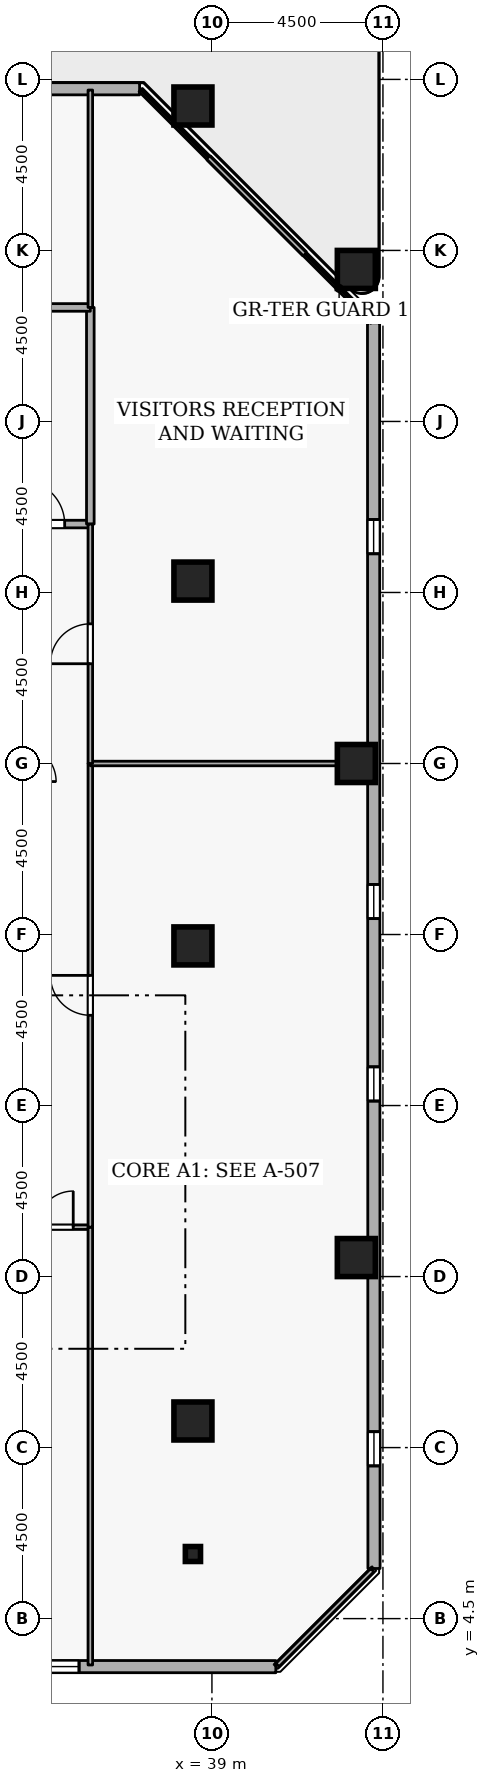
"""IFC4 building model, lengths in metres.
Left out: names, types, materials, properties, quantities, classifications, styles, units other than length and angle.
Written with IfcOpenShell. Run it as: python <this file> out.ifc"""

import sys

from ifc_helpers import new_model, si_unit, direction, frame, frame_2d, origin, origin_2d, place, context, subcontext, project, spatial, rectangle, i_section, extrude, element, fill, save


model = new_model("IFC4")
c1 = context("Model", 3, precision=1e-05, world=origin(), true_north=direction((0.0, 1.0)))
c2 = subcontext(c1, "Body", "Model", "MODEL_VIEW")
j1 = project(units=[si_unit("LENGTHUNIT", "METRE"), si_unit("PLANEANGLEUNIT", "RADIAN")], contexts=[c1])
p1 = place(None, origin())
s1 = spatial("IfcSite", under=j1, at=p1, CompositionType="ELEMENT")
p2 = place(p1, origin())
s2 = spatial("IfcBuilding", under=s1, at=p2, CompositionType="ELEMENT")
p3 = place(p2, frame((0.0, 0.0, 229.5)))
s3 = spatial("IfcBuildingStorey", under=s2, at=p3, CompositionType="ELEMENT", Elevation=229.5)
for number, where, z_axis, x_axis in (
    (1, (38.5, 9.7, 0.0), (0.0, 0.0, 1.0), (1.0, 0.0, 0.0)),
    (2, (42.8, 14.0, 0.0), (0.0, 0.0, 1.0), (1.0, 0.0, 0.0)),
    (3, (42.8, 27.0, 0.0), (0.0, 0.0, 1.0), (1.0, 0.0, 0.0)),
    (4, (42.8, 40.0, 0.0), (0.0, 0.0, 1.0), (1.0, 0.0, 0.0)),
    (5, (38.5, 44.3, 0.0), (0.0, 0.0, 1.0), (1.0, 0.0, 0.0)),
    (6, (38.5, 22.2, 0.0), (0.0, 0.0, 1.0), (1.0, 0.0, 0.0)),
    (7, (38.5, 31.8, 0.0), (0.0, 0.0, 1.0), (1.0, 0.0, 0.0)),
):
    element("IfcColumn", number, at=place(p3, frame(where, z_axis=z_axis, x_axis=x_axis)), inside=s3, PredefinedType="COLUMN", context=c2, shape_type="SweptSolid", body=[
        extrude(rectangle(XDim=1.0, YDim=1.0, at=origin_2d()), origin(), (0.0, 0.0, 1.0), 3.6),
    ])
p4 = place(p3, frame((38.5, 6.2, 0.0), z_axis=(0.0, 0.0, 1.0), x_axis=(1.0, 0.0, 0.0)))
e8 = element("IfcColumn", 8, at=p4, inside=s3, PredefinedType="COLUMN", context=c2, shape_type="SweptSolid", body=[
    extrude(i_section(OverallWidth=0.399, OverallDepth=0.394, WebThickness=0.023, FlangeThickness=0.037, FilletRadius=0.015, at=origin_2d()), origin(), (0.0, 0.0, 1.0), 3.6),
])
p5 = place(p3, frame((7.904, 3.247, 0.0), z_axis=(0.0, 0.0, 1.0), x_axis=(0.999999933399, -0.000364968916, 0.0)))
e9 = element("IfcWall", 9, at=p5, inside=s3, PredefinedType="STANDARD", context=c2, shape_type="SweptSolid", body=[
    extrude(rectangle(XDim=32.778, YDim=0.32, at=frame_2d((16.389, 0.0))), origin(), (0.0, 0.0, 1.0), 2.7),
])
p6 = place(p5, frame((2.7, 0.0, 0.72)))
e10 = element("IfcOpeningElement", 10, at=p6, cuts=e9, PredefinedType="OPENING", context=c2, shape_type="SweptSolid", body=[
    extrude(rectangle(XDim=0.9, YDim=1.75, at=frame_2d((0.45, 0.875))), frame((0.0, 0.17, 0.0), z_axis=(0.0, -1.0, 0.0), x_axis=(1.0, 0.0, 0.0)), (0.0, 0.0, 1.0), 0.34),
])
p7 = place(p5, frame((12.3, 0.0, 0.72)))
e11 = element("IfcOpeningElement", 11, at=p7, cuts=e9, PredefinedType="OPENING", context=c2, shape_type="SweptSolid", body=[
    extrude(rectangle(XDim=0.9, YDim=1.75, at=frame_2d((0.45, 0.875))), frame((0.0, 0.17, 0.0), z_axis=(0.0, -1.0, 0.0), x_axis=(1.0, 0.0, 0.0)), (0.0, 0.0, 1.0), 0.34),
])
p8 = place(p5, frame((17.1, 0.0, 0.72)))
e12 = element("IfcOpeningElement", 12, at=p8, cuts=e9, PredefinedType="OPENING", context=c2, shape_type="SweptSolid", body=[
    extrude(rectangle(XDim=0.9, YDim=1.75, at=frame_2d((0.45, 0.875))), frame((0.0, 0.17, 0.0), z_axis=(0.0, -1.0, 0.0), x_axis=(1.0, 0.0, 0.0)), (0.0, 0.0, 1.0), 0.34),
])
p9 = place(p5, frame((21.9, 0.0, 0.72)))
e13 = element("IfcOpeningElement", 13, at=p9, cuts=e9, PredefinedType="OPENING", context=c2, shape_type="SweptSolid", body=[
    extrude(rectangle(XDim=0.9, YDim=1.75, at=frame_2d((0.45, 0.875))), frame((0.0, 0.17, 0.0), z_axis=(0.0, -1.0, 0.0), x_axis=(1.0, 0.0, 0.0)), (0.0, 0.0, 1.0), 0.34),
])
p10 = place(p5, frame((26.7, 0.0, 0.72)))
e14 = element("IfcOpeningElement", 14, at=p10, cuts=e9, PredefinedType="OPENING", context=c2, shape_type="SweptSolid", body=[
    extrude(rectangle(XDim=0.9, YDim=1.75, at=frame_2d((0.45, 0.875))), frame((0.0, 0.17, 0.0), z_axis=(0.0, -1.0, 0.0), x_axis=(1.0, 0.0, 0.0)), (0.0, 0.0, 1.0), 0.34),
])
p11 = place(p3, frame((43.265, 5.819, 0.0), z_axis=(0.0, 0.0, 1.0), x_axis=(-0.000364968916, 0.999999933399, 0.0)))
e15 = element("IfcWall", 15, at=p11, inside=s3, PredefinedType="STANDARD", context=c2, shape_type="SweptSolid", body=[
    extrude(rectangle(XDim=32.778, YDim=0.32, at=frame_2d((16.389, 0.0))), origin(), (0.0, 0.0, 1.0), 2.7),
])
p12 = place(p11, frame((2.7, 0.0, 0.72)))
e16 = element("IfcOpeningElement", 16, at=p12, cuts=e15, PredefinedType="OPENING", context=c2, shape_type="SweptSolid", body=[
    extrude(rectangle(XDim=0.9, YDim=1.75, at=frame_2d((0.45, 0.875))), frame((0.0, 0.17, 0.0), z_axis=(0.0, -1.0, 0.0), x_axis=(1.0, 0.0, 0.0)), (0.0, 0.0, 1.0), 0.34),
])
p13 = place(p11, frame((12.3, 0.0, 0.72)))
e17 = element("IfcOpeningElement", 17, at=p13, cuts=e15, PredefinedType="OPENING", context=c2, shape_type="SweptSolid", body=[
    extrude(rectangle(XDim=0.9, YDim=1.75, at=frame_2d((0.45, 0.875))), frame((0.0, 0.17, 0.0), z_axis=(0.0, -1.0, 0.0), x_axis=(1.0, 0.0, 0.0)), (0.0, 0.0, 1.0), 0.34),
])
p14 = place(p11, frame((17.1, 0.0, 0.72)))
e18 = element("IfcOpeningElement", 18, at=p14, cuts=e15, PredefinedType="OPENING", context=c2, shape_type="SweptSolid", body=[
    extrude(rectangle(XDim=0.9, YDim=1.75, at=frame_2d((0.45, 0.875))), frame((0.0, 0.17, 0.0), z_axis=(0.0, -1.0, 0.0), x_axis=(1.0, 0.0, 0.0)), (0.0, 0.0, 1.0), 0.34),
])
p15 = place(p11, frame((26.7, 0.0, 0.72)))
e19 = element("IfcOpeningElement", 19, at=p15, cuts=e15, PredefinedType="OPENING", context=c2, shape_type="SweptSolid", body=[
    extrude(rectangle(XDim=0.9, YDim=1.75, at=frame_2d((0.45, 0.875))), frame((0.0, 0.17, 0.0), z_axis=(0.0, -1.0, 0.0), x_axis=(1.0, 0.0, 0.0)), (0.0, 0.0, 1.0), 0.34),
])
p16 = place(p3, frame((37.096, 44.753, 0.0), z_axis=(0.0, 0.0, 1.0), x_axis=(-0.999999933399, 0.000364968916, 0.0)))
e20 = element("IfcWall", 20, at=p16, inside=s3, PredefinedType="STANDARD", context=c2, shape_type="SweptSolid", body=[
    extrude(rectangle(XDim=32.778, YDim=0.32, at=frame_2d((16.389, 0.0))), origin(), (0.0, 0.0, 1.0), 2.7),
])
p17 = place(p16, frame((19.914, 0.0, 0.0)))
e21 = element("IfcOpeningElement", 21, at=p17, cuts=e20, PredefinedType="OPENING", context=c2, shape_type="SweptSolid", body=[
    extrude(rectangle(XDim=1.15, YDim=2.1, at=frame_2d((0.575, 1.05))), frame((0.0, 0.17, 0.0), z_axis=(0.0, -1.0, 0.0), x_axis=(1.0, 0.0, 0.0)), (0.0, 0.0, 1.0), 0.34),
])
p18 = place(p16, frame((2.7, 0.0, 0.72)))
e22 = element("IfcOpeningElement", 22, at=p18, cuts=e20, PredefinedType="OPENING", context=c2, shape_type="SweptSolid", body=[
    extrude(rectangle(XDim=0.9, YDim=1.75, at=frame_2d((0.45, 0.875))), frame((0.0, 0.17, 0.0), z_axis=(0.0, -1.0, 0.0), x_axis=(1.0, 0.0, 0.0)), (0.0, 0.0, 1.0), 0.34),
])
p19 = place(p16, frame((7.5, 0.0, 0.72)))
e23 = element("IfcOpeningElement", 23, at=p19, cuts=e20, PredefinedType="OPENING", context=c2, shape_type="SweptSolid", body=[
    extrude(rectangle(XDim=0.9, YDim=1.75, at=frame_2d((0.45, 0.875))), frame((0.0, 0.17, 0.0), z_axis=(0.0, -1.0, 0.0), x_axis=(1.0, 0.0, 0.0)), (0.0, 0.0, 1.0), 0.34),
])
p20 = place(p16, frame((17.1, 0.0, 0.72)))
e24 = element("IfcOpeningElement", 24, at=p20, cuts=e20, PredefinedType="OPENING", context=c2, shape_type="SweptSolid", body=[
    extrude(rectangle(XDim=0.9, YDim=1.75, at=frame_2d((0.45, 0.875))), frame((0.0, 0.17, 0.0), z_axis=(0.0, -1.0, 0.0), x_axis=(1.0, 0.0, 0.0)), (0.0, 0.0, 1.0), 0.34),
])
p21 = place(p16, frame((21.9, 0.0, 0.72)))
e25 = element("IfcOpeningElement", 25, at=p21, cuts=e20, PredefinedType="OPENING", context=c2, shape_type="SweptSolid", body=[
    extrude(rectangle(XDim=0.9, YDim=1.75, at=frame_2d((0.45, 0.875))), frame((0.0, 0.17, 0.0), z_axis=(0.0, -1.0, 0.0), x_axis=(1.0, 0.0, 0.0)), (0.0, 0.0, 1.0), 0.34),
])
p22 = place(p16, frame((26.7, 0.0, 0.72)))
e26 = element("IfcOpeningElement", 26, at=p22, cuts=e20, PredefinedType="OPENING", context=c2, shape_type="SweptSolid", body=[
    extrude(rectangle(XDim=0.9, YDim=1.75, at=frame_2d((0.45, 0.875))), frame((0.0, 0.17, 0.0), z_axis=(0.0, -1.0, 0.0), x_axis=(1.0, 0.0, 0.0)), (0.0, 0.0, 1.0), 0.34),
])
p23 = place(p3, frame((33.3, 33.3, 0.0), z_axis=(0.0, 0.0, 1.0), x_axis=(1.0, 0.0, 0.0)))
e27 = element("IfcWall", 27, at=p23, inside=s3, PredefinedType="STANDARD", context=c2, shape_type="SweptSolid", body=[
    extrude(rectangle(XDim=2.5, YDim=0.2, at=frame_2d((1.25, 0.0))), origin(), (0.0, 0.0, 1.0), 3.3),
])
p24 = place(p23, frame((0.675, 0.0, 0.0)))
e28 = element("IfcOpeningElement", 28, at=p24, cuts=e27, PredefinedType="OPENING", context=c2, shape_type="SweptSolid", body=[
    extrude(rectangle(XDim=1.15, YDim=2.1, at=frame_2d((0.575, 1.05))), frame((0.0, 0.11, 0.0), z_axis=(0.0, -1.0, 0.0), x_axis=(1.0, 0.0, 0.0)), (0.0, 0.0, 1.0), 0.22),
])
p25 = place(p3, frame((35.8, 33.3, 0.0), z_axis=(0.0, 0.0, 1.0), x_axis=(0.0, 1.0, 0.0)))
e29 = element("IfcWall", 29, at=p25, inside=s3, PredefinedType="STANDARD", context=c2, shape_type="SweptSolid", body=[
    extrude(rectangle(XDim=5.7, YDim=0.2, at=frame_2d((2.85, 0.0))), origin(), (0.0, 0.0, 1.0), 3.3),
])
p26 = place(p3, frame((35.8, 39.0, 0.0), z_axis=(0.0, 0.0, 1.0), x_axis=(-1.0, 0.0, 0.0)))
e30 = element("IfcWall", 30, at=p26, inside=s3, PredefinedType="STANDARD", context=c2, shape_type="SweptSolid", body=[
    extrude(rectangle(XDim=2.5, YDim=0.2, at=frame_2d((1.25, 0.0))), origin(), (0.0, 0.0, 1.0), 3.3),
])
p27 = place(p3, frame((33.95, 14.8, 0.0), z_axis=(0.0, 0.0, 1.0), x_axis=(1.0, 0.0, 0.0)))
e31 = element("IfcWall", 31, at=p27, inside=s3, PredefinedType="PARTITIONING", context=c2, shape_type="SweptSolid", body=[
    extrude(rectangle(XDim=1.85, YDim=0.12, at=frame_2d((0.925, 0.0))), origin(), (0.0, 0.0, 1.0), 3.3),
])
p28 = place(p27, frame((0.45, 0.0, 0.0)))
e32 = element("IfcOpeningElement", 32, at=p28, cuts=e31, PredefinedType="OPENING", context=c2, shape_type="SweptSolid", body=[
    extrude(rectangle(XDim=0.95, YDim=2.1, at=frame_2d((0.475, 1.05))), frame((0.0, 0.07, 0.0), z_axis=(0.0, -1.0, 0.0), x_axis=(1.0, 0.0, 0.0)), (0.0, 0.0, 1.0), 0.14),
])
p29 = place(p3, frame((35.8, 14.8, 0.0), z_axis=(0.0, 0.0, 1.0), x_axis=(0.0, -1.0, 0.0)))
e33 = element("IfcWall", 33, at=p29, inside=s3, PredefinedType="PARTITIONING", context=c2, shape_type="SweptSolid", body=[
    extrude(rectangle(XDim=11.52, YDim=0.12, at=frame_2d((5.76, 0.0))), origin(), (0.0, 0.0, 1.0), 3.3),
])
p30 = place(p3, frame((35.8, 14.8, 0.0), z_axis=(0.0, 0.0, 1.0), x_axis=(0.0, 1.0, 0.0)))
e34 = element("IfcWall", 34, at=p30, inside=s3, PredefinedType="PARTITIONING", context=c2, shape_type="SweptSolid", body=[
    extrude(rectangle(XDim=12.2, YDim=0.12, at=frame_2d((6.1, 0.0))), origin(), (0.0, 0.0, 1.0), 3.3),
])
p31 = place(p30, frame((5.575, 0.0, 0.0)))
e35 = element("IfcOpeningElement", 35, at=p31, cuts=e34, PredefinedType="OPENING", context=c2, shape_type="SweptSolid", body=[
    extrude(rectangle(XDim=1.05, YDim=2.1, at=frame_2d((0.525, 1.05))), frame((0.0, 0.07, 0.0), z_axis=(0.0, -1.0, 0.0), x_axis=(1.0, 0.0, 0.0)), (0.0, 0.0, 1.0), 0.14),
])
p32 = place(p3, frame((35.8, 27.0, 0.0), z_axis=(0.0, 0.0, 1.0), x_axis=(1.0, 0.0, 0.0)))
e36 = element("IfcWall", 36, at=p32, inside=s3, PredefinedType="PARTITIONING", context=c2, shape_type="SweptSolid", body=[
    extrude(rectangle(XDim=7.42, YDim=0.12, at=frame_2d((3.71, 0.0))), origin(), (0.0, 0.0, 1.0), 2.892),
])
p33 = place(p3, frame((43.22, 5.775, 0.0), z_axis=(0.0, 0.0, 1.0), x_axis=(-0.707106781187, -0.707106781187, 0.0)))
e37 = element("IfcWall", 37, at=p33, inside=s3, PredefinedType="PARTITIONING", context=c2, shape_type="SweptSolid", body=[
    extrude(rectangle(XDim=3.528, YDim=0.12, at=frame_2d((1.764, 0.0))), origin(), (0.0, 0.0, 1.0), 3.3),
])
p34 = place(p3, frame((35.8, 39.0, 0.0), z_axis=(0.0, 0.0, 1.0), x_axis=(0.0, 1.0, 0.0)))
e38 = element("IfcWall", 38, at=p34, inside=s3, PredefinedType="PARTITIONING", context=c2, shape_type="SweptSolid", body=[
    extrude(rectangle(XDim=5.72, YDim=0.12, at=frame_2d((2.86, 0.0))), origin(), (0.0, 0.0, 1.0), 3.3),
])
p35 = place(p3, frame((37.125, 44.72, 0.0), z_axis=(0.0, 0.0, 1.0), x_axis=(0.707106781187, -0.707106781187, 0.0)))
e39 = element("IfcWall", 39, at=p35, inside=s3, PredefinedType="PARTITIONING", context=c2, shape_type="SweptSolid", body=[
    extrude(rectangle(XDim=8.619, YDim=0.12, at=frame_2d((4.31, 0.0))), origin(), (0.0, 0.0, 1.0), 3.3),
])
p36 = place(p3, frame((35.8, 27.0, 0.0), z_axis=(0.0, 0.0, 1.0), x_axis=(0.0, 1.0, 0.0)))
e40 = element("IfcWall", 40, at=p36, inside=s3, PredefinedType="PARTITIONING", context=c2, shape_type="SweptSolid", body=[
    extrude(rectangle(XDim=6.3, YDim=0.12, at=frame_2d((3.15, 0.0))), origin(), (0.0, 0.0, 1.0), 3.3),
])
p37 = place(p36, frame((2.625, 0.0, 0.0)))
e41 = element("IfcOpeningElement", 41, at=p37, cuts=e40, PredefinedType="OPENING", context=c2, shape_type="SweptSolid", body=[
    extrude(rectangle(XDim=1.05, YDim=2.1, at=frame_2d((0.525, 1.05))), frame((0.0, 0.07, 0.0), z_axis=(0.0, -1.0, 0.0), x_axis=(1.0, 0.0, 0.0)), (0.0, 0.0, 1.0), 0.14),
])
p38 = place(p10, origin())
e42 = element("IfcWindow", 42, at=p38, inside=s3, PartitioningType="SINGLE_PANEL", PredefinedType="WINDOW", context=c2, shape_type="SweptSolid", body=[
    extrude(rectangle(XDim=0.9, YDim=1.75, at=frame_2d((0.45, 0.875))), frame((0.0, 0.03, 0.0), z_axis=(0.0, -1.0, 0.0), x_axis=(1.0, 0.0, 0.0)), (0.0, 0.0, 1.0), 0.06),
])
fill(e14, e42)
p39 = place(p12, origin())
e43 = element("IfcWindow", 43, at=p39, inside=s3, PartitioningType="SINGLE_PANEL", PredefinedType="WINDOW", context=c2, shape_type="SweptSolid", body=[
    extrude(rectangle(XDim=0.9, YDim=1.75, at=frame_2d((0.45, 0.875))), frame((0.0, 0.03, 0.0), z_axis=(0.0, -1.0, 0.0), x_axis=(1.0, 0.0, 0.0)), (0.0, 0.0, 1.0), 0.06),
])
fill(e16, e43)
p40 = place(p13, origin())
e44 = element("IfcWindow", 44, at=p40, inside=s3, PartitioningType="SINGLE_PANEL", PredefinedType="WINDOW", context=c2, shape_type="SweptSolid", body=[
    extrude(rectangle(XDim=0.9, YDim=1.75, at=frame_2d((0.45, 0.875))), frame((0.0, 0.03, 0.0), z_axis=(0.0, -1.0, 0.0), x_axis=(1.0, 0.0, 0.0)), (0.0, 0.0, 1.0), 0.06),
])
fill(e17, e44)
p41 = place(p14, origin())
e45 = element("IfcWindow", 45, at=p41, inside=s3, PartitioningType="SINGLE_PANEL", PredefinedType="WINDOW", context=c2, shape_type="SweptSolid", body=[
    extrude(rectangle(XDim=0.9, YDim=1.75, at=frame_2d((0.45, 0.875))), frame((0.0, 0.03, 0.0), z_axis=(0.0, -1.0, 0.0), x_axis=(1.0, 0.0, 0.0)), (0.0, 0.0, 1.0), 0.06),
])
fill(e18, e45)
p42 = place(p15, origin())
e46 = element("IfcWindow", 46, at=p42, inside=s3, PartitioningType="SINGLE_PANEL", PredefinedType="WINDOW", context=c2, shape_type="SweptSolid", body=[
    extrude(rectangle(XDim=0.9, YDim=1.75, at=frame_2d((0.45, 0.875))), frame((0.0, 0.03, 0.0), z_axis=(0.0, -1.0, 0.0), x_axis=(1.0, 0.0, 0.0)), (0.0, 0.0, 1.0), 0.06),
])
fill(e19, e46)
p43 = place(p24, origin())
e47 = element("IfcDoor", 47, at=p43, inside=s3, OperationType="SINGLE_SWING_LEFT", PredefinedType="DOOR", context=c2, shape_type="SweptSolid", body=[
    extrude(rectangle(XDim=1.15, YDim=2.1, at=frame_2d((0.575, 1.05))), frame((0.0, 0.025, 0.0), z_axis=(0.0, -1.0, 0.0), x_axis=(1.0, 0.0, 0.0)), (0.0, 0.0, 1.0), 0.05),
])
fill(e28, e47)
p44 = place(p28, origin())
e48 = element("IfcDoor", 48, at=p44, inside=s3, OperationType="SINGLE_SWING_RIGHT", PredefinedType="DOOR", context=c2, shape_type="SweptSolid", body=[
    extrude(rectangle(XDim=0.95, YDim=2.1, at=frame_2d((0.475, 1.05))), frame((0.0, 0.025, 0.0), z_axis=(0.0, -1.0, 0.0), x_axis=(1.0, 0.0, 0.0)), (0.0, 0.0, 1.0), 0.05),
])
fill(e32, e48)
p45 = place(p31, origin())
e49 = element("IfcDoor", 49, at=p45, inside=s3, OperationType="SINGLE_SWING_RIGHT", PredefinedType="DOOR", context=c2, shape_type="SweptSolid", body=[
    extrude(rectangle(XDim=1.05, YDim=2.1, at=frame_2d((0.525, 1.05))), frame((0.0, 0.025, 0.0), z_axis=(0.0, -1.0, 0.0), x_axis=(1.0, 0.0, 0.0)), (0.0, 0.0, 1.0), 0.05),
])
fill(e35, e49)
p46 = place(p37, origin())
e50 = element("IfcDoor", 50, at=p46, inside=s3, OperationType="SINGLE_SWING_LEFT", PredefinedType="DOOR", context=c2, shape_type="SweptSolid", body=[
    extrude(rectangle(XDim=1.05, YDim=2.1, at=frame_2d((0.525, 1.05))), frame((0.0, 0.025, 0.0), z_axis=(0.0, -1.0, 0.0), x_axis=(1.0, 0.0, 0.0)), (0.0, 0.0, 1.0), 0.05),
])
fill(e41, e50)
save(model, sys.argv[1])
